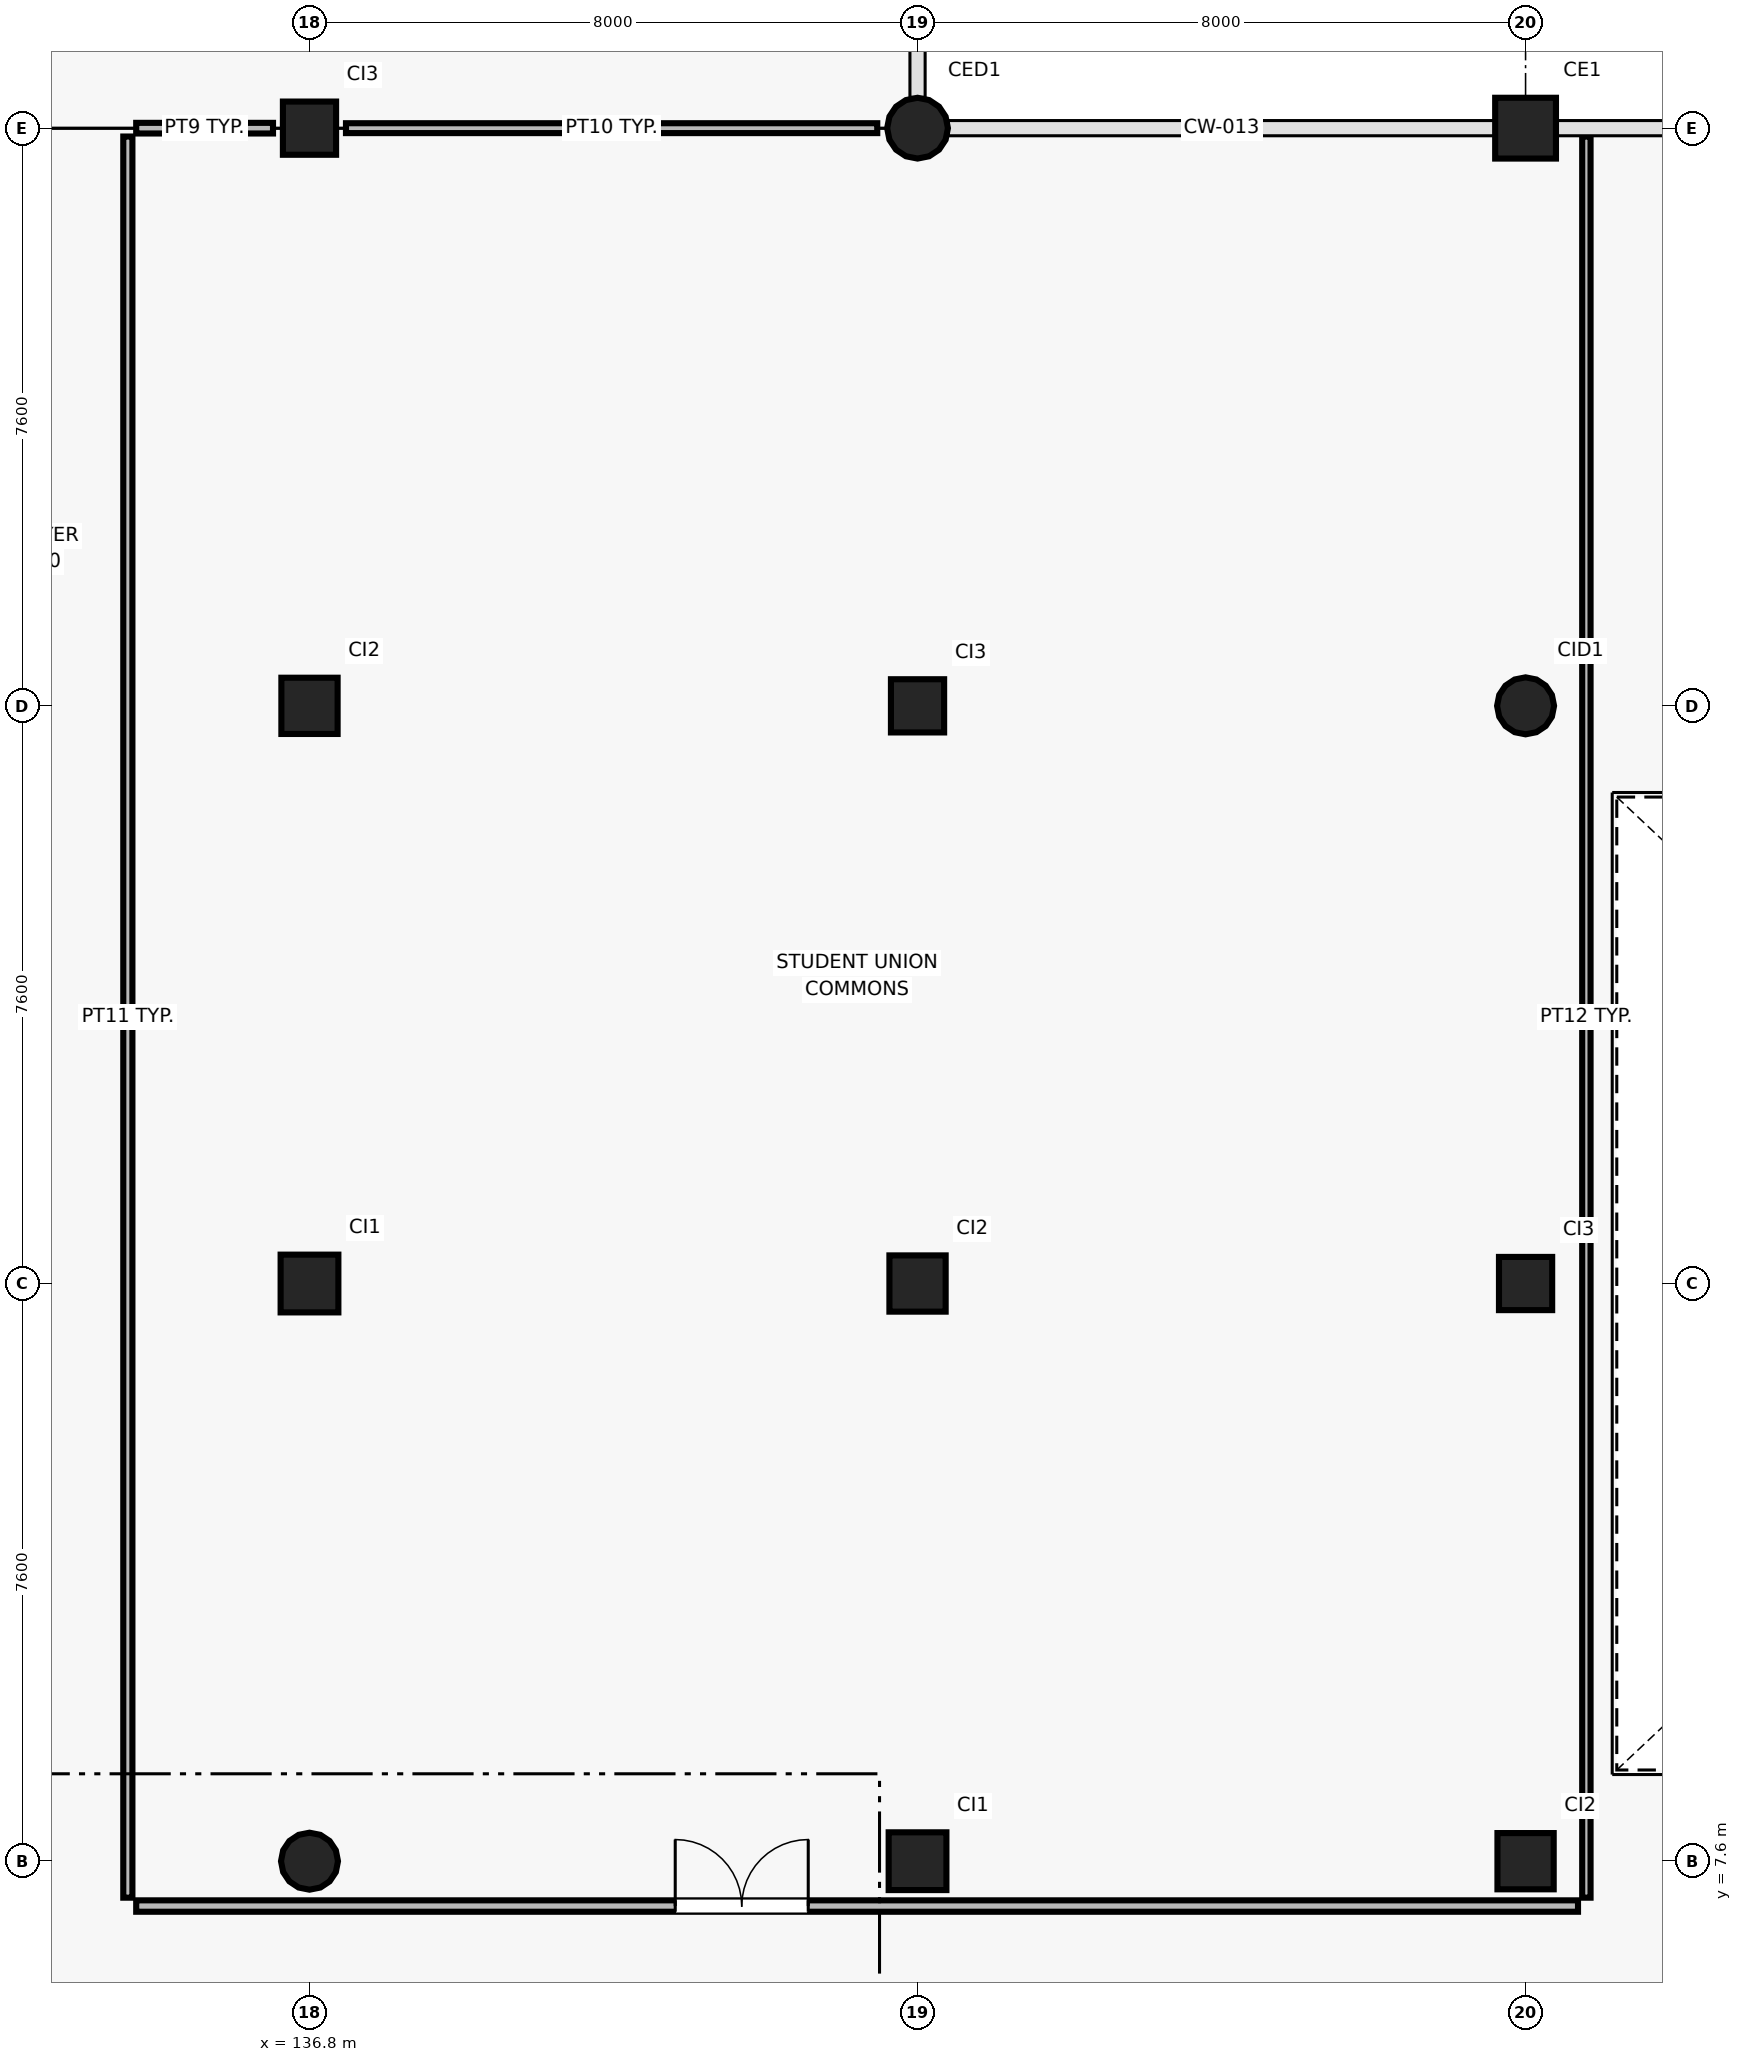
"""IFC4 building model, lengths in metres.
Left out: names, types, materials, properties, quantities, classifications, styles, units other than length and angle.
Written with IfcOpenShell. Run it as: python <this file> out.ifc"""

import sys

from ifc_helpers import new_model, si_unit, direction, frame, frame_2d, origin, origin_2d, place, context, subcontext, project, spatial, rectangle, circle, extrude, element, fill, save


model = new_model("IFC4")
c1 = context("Model", 3, precision=1e-05, world=origin(), true_north=direction((0.0, 1.0)))
c2 = subcontext(c1, "Body", "Model", "MODEL_VIEW")
j1 = project(units=[si_unit("LENGTHUNIT", "METRE"), si_unit("PLANEANGLEUNIT", "RADIAN")], contexts=[c1])
p1 = place(None, origin())
s1 = spatial("IfcSite", under=j1, at=p1, CompositionType="ELEMENT")
p2 = place(p1, origin())
s2 = spatial("IfcBuilding", under=s1, at=p2, CompositionType="ELEMENT")
p3 = place(p2, origin())
s3 = spatial("IfcBuildingStorey", under=s2, at=p3, CompositionType="ELEMENT", Elevation=0.0)
p4 = place(p3, frame((136.8, 7.6, 0.0), z_axis=(0.0, 0.0, 1.0), x_axis=(1.0, 0.0, 0.0)))
e1 = element("IfcColumn", 1, at=p4, inside=s3, PredefinedType="COLUMN", context=c2, shape_type="SweptSolid", body=[
    extrude(circle(Radius=0.375, at=origin_2d()), origin(), (0.0, 0.0, 1.0), 4.5),
])
p5 = place(p3, frame((136.8, 15.2, 0.0), z_axis=(0.0, 0.0, 1.0), x_axis=(1.0, 0.0, 0.0)))
e2 = element("IfcColumn", 2, at=p5, inside=s3, PredefinedType="COLUMN", context=c2, shape_type="SweptSolid", body=[
    extrude(rectangle(XDim=0.76, YDim=0.76, at=origin_2d()), origin(), (0.0, 0.0, 1.0), 4.5),
])
p6 = place(p3, frame((136.8, 22.8, 0.0), z_axis=(0.0, 0.0, 1.0), x_axis=(1.0, 0.0, 0.0)))
e3 = element("IfcColumn", 3, at=p6, inside=s3, PredefinedType="COLUMN", context=c2, shape_type="SweptSolid", body=[
    extrude(rectangle(XDim=0.74, YDim=0.74, at=origin_2d()), origin(), (0.0, 0.0, 1.0), 4.5),
])
p7 = place(p3, frame((136.8, 30.4, 0.0), z_axis=(0.0, 0.0, 1.0), x_axis=(1.0, 0.0, 0.0)))
e4 = element("IfcColumn", 4, at=p7, inside=s3, PredefinedType="COLUMN", context=c2, shape_type="SweptSolid", body=[
    extrude(rectangle(XDim=0.7, YDim=0.7, at=origin_2d()), origin(), (0.0, 0.0, 1.0), 4.5),
])
p8 = place(p3, frame((144.8, 7.6, 0.0), z_axis=(0.0, 0.0, 1.0), x_axis=(1.0, 0.0, 0.0)))
e5 = element("IfcColumn", 5, at=p8, inside=s3, PredefinedType="COLUMN", context=c2, shape_type="SweptSolid", body=[
    extrude(rectangle(XDim=0.76, YDim=0.76, at=origin_2d()), origin(), (0.0, 0.0, 1.0), 4.5),
])
p9 = place(p3, frame((144.8, 15.2, 0.0), z_axis=(0.0, 0.0, 1.0), x_axis=(1.0, 0.0, 0.0)))
e6 = element("IfcColumn", 6, at=p9, inside=s3, PredefinedType="COLUMN", context=c2, shape_type="SweptSolid", body=[
    extrude(rectangle(XDim=0.74, YDim=0.74, at=origin_2d()), origin(), (0.0, 0.0, 1.0), 4.5),
])
p10 = place(p3, frame((144.8, 22.8, 0.0), z_axis=(0.0, 0.0, 1.0), x_axis=(1.0, 0.0, 0.0)))
e7 = element("IfcColumn", 7, at=p10, inside=s3, PredefinedType="COLUMN", context=c2, shape_type="SweptSolid", body=[
    extrude(rectangle(XDim=0.7, YDim=0.7, at=origin_2d()), origin(), (0.0, 0.0, 1.0), 4.5),
])
p11 = place(p3, frame((144.8, 30.4, 0.0), z_axis=(0.0, 0.0, 1.0), x_axis=(1.0, 0.0, 0.0)))
e8 = element("IfcColumn", 8, at=p11, inside=s3, PredefinedType="COLUMN", context=c2, shape_type="SweptSolid", body=[
    extrude(circle(Radius=0.4, at=origin_2d()), origin(), (0.0, 0.0, 1.0), 4.5),
])
p12 = place(p3, frame((152.8, 7.6, 0.0), z_axis=(0.0, 0.0, 1.0), x_axis=(1.0, 0.0, 0.0)))
e9 = element("IfcColumn", 9, at=p12, inside=s3, PredefinedType="COLUMN", context=c2, shape_type="SweptSolid", body=[
    extrude(rectangle(XDim=0.74, YDim=0.74, at=origin_2d()), origin(), (0.0, 0.0, 1.0), 4.5),
])
p13 = place(p3, frame((152.8, 15.2, 0.0), z_axis=(0.0, 0.0, 1.0), x_axis=(1.0, 0.0, 0.0)))
e10 = element("IfcColumn", 10, at=p13, inside=s3, PredefinedType="COLUMN", context=c2, shape_type="SweptSolid", body=[
    extrude(rectangle(XDim=0.7, YDim=0.7, at=origin_2d()), origin(), (0.0, 0.0, 1.0), 4.5),
])
p14 = place(p3, frame((152.8, 22.8, 0.0), z_axis=(0.0, 0.0, 1.0), x_axis=(1.0, 0.0, 0.0)))
e11 = element("IfcColumn", 11, at=p14, inside=s3, PredefinedType="COLUMN", context=c2, shape_type="SweptSolid", body=[
    extrude(circle(Radius=0.375, at=origin_2d()), origin(), (0.0, 0.0, 1.0), 4.5),
])
p15 = place(p3, frame((152.8, 30.4, 0.0), z_axis=(0.0, 0.0, 1.0), x_axis=(1.0, 0.0, 0.0)))
e12 = element("IfcColumn", 12, at=p15, inside=s3, PredefinedType="COLUMN", context=c2, shape_type="SweptSolid", body=[
    extrude(rectangle(XDim=0.8, YDim=0.8, at=origin_2d()), origin(), (0.0, 0.0, 1.0), 4.5),
])
p16 = place(p3, frame((134.52, 7.01, 0.0), z_axis=(0.0, 0.0, 1.0), x_axis=(1.0, 0.0, 0.0)))
e13 = element("IfcWall", 13, at=p16, inside=s3, PredefinedType="PARTITIONING", context=c2, shape_type="SweptSolid", body=[
    extrude(rectangle(XDim=18.97, YDim=0.15, at=frame_2d((9.485, 0.0))), origin(), (0.0, 0.0, 1.0), 4.2),
])
p17 = place(p16, frame((7.092, 0.0, 0.0)))
e14 = element("IfcOpeningElement", 14, at=p17, cuts=e13, PredefinedType="OPENING", context=c2, shape_type="SweptSolid", body=[
    extrude(rectangle(XDim=1.75, YDim=2.25, at=frame_2d((0.875, 1.125))), frame((0.0, 0.085, 0.0), z_axis=(0.0, -1.0, 0.0), x_axis=(1.0, 0.0, 0.0)), (0.0, 0.0, 1.0), 0.17),
])
p18 = place(p3, frame((134.52, 30.4, 0.0), z_axis=(0.0, 0.0, 1.0), x_axis=(1.0, 0.0, 0.0)))
e15 = element("IfcWall", 15, at=p18, inside=s3, PredefinedType="PARTITIONING", context=c2, shape_type="SweptSolid", body=[
    extrude(rectangle(XDim=1.8, YDim=0.14, at=frame_2d((0.9, 0.0))), origin(), (0.0, 0.0, 1.0), 4.2),
])
p19 = place(p3, frame((137.28, 30.4, 0.0), z_axis=(0.0, 0.0, 1.0), x_axis=(1.0, 0.0, 0.0)))
e16 = element("IfcWall", 16, at=p19, inside=s3, PredefinedType="PARTITIONING", context=c2, shape_type="SweptSolid", body=[
    extrude(rectangle(XDim=6.99, YDim=0.13, at=frame_2d((3.495, 0.0))), origin(), (0.0, 0.0, 1.0), 3.67),
])
p20 = place(p3, frame((134.41, 7.12, 0.0), z_axis=(0.0, 0.0, 1.0), x_axis=(0.0, 1.0, 0.0)))
e17 = element("IfcWall", 17, at=p20, inside=s3, PredefinedType="PARTITIONING", context=c2, shape_type="SweptSolid", body=[
    extrude(rectangle(XDim=23.17, YDim=0.12, at=frame_2d((11.585, 0.0))), origin(), (0.0, 0.0, 1.0), 4.2),
])
p21 = place(p3, frame((153.6, 7.12, 0.0), z_axis=(0.0, 0.0, 1.0), x_axis=(0.0, 1.0, 0.0)))
e18 = element("IfcWall", 18, at=p21, inside=s3, PredefinedType="PARTITIONING", context=c2, shape_type="SweptSolid", body=[
    extrude(rectangle(XDim=23.17, YDim=0.11, at=frame_2d((11.585, 0.0))), origin(), (0.0, 0.0, 1.0), 4.2),
])
p22 = place(p17, origin())
e19 = element("IfcDoor", 19, at=p22, inside=s3, OperationType="DOUBLE_DOOR_SINGLE_SWING", PredefinedType="DOOR", context=c2, shape_type="SweptSolid", body=[
    extrude(rectangle(XDim=1.75, YDim=2.25, at=frame_2d((0.875, 1.125))), frame((0.0, 0.025, 0.0), z_axis=(0.0, -1.0, 0.0), x_axis=(1.0, 0.0, 0.0)), (0.0, 0.0, 1.0), 0.05),
])
fill(e14, e19)
save(model, sys.argv[1])
